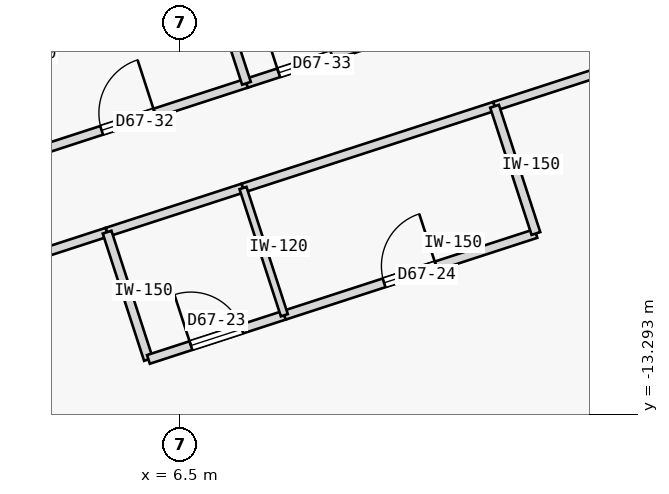
"""IFC4 building model, lengths in metres.
Left out: names, types, materials, properties, quantities, classifications, styles, units other than length and angle.
Written with IfcOpenShell. Run it as: python <this file> out.ifc"""

import sys

from ifc_helpers import new_model, si_unit, direction, frame, frame_2d, origin, place, context, subcontext, project, spatial, rectangle, extrude, element, fill, save


model = new_model("IFC4")
c1 = context("Model", 3, precision=1e-05, world=origin(), true_north=direction((0.0, 1.0)))
c2 = subcontext(c1, "Body", "Model", "MODEL_VIEW")
j1 = project(units=[si_unit("LENGTHUNIT", "METRE"), si_unit("PLANEANGLEUNIT", "RADIAN")], contexts=[c1])
p1 = place(None, origin())
s1 = spatial("IfcSite", under=j1, at=p1, CompositionType="ELEMENT")
p2 = place(p1, origin())
s2 = spatial("IfcBuilding", under=s1, at=p2, CompositionType="ELEMENT")
p3 = place(p2, frame((0.0, 0.0, 251.1)))
s3 = spatial("IfcBuildingStorey", under=s2, at=p3, CompositionType="ELEMENT", Elevation=251.1)
p4 = place(p3, frame((-1.643, -12.549, 0.0), z_axis=(0.0, 0.0, 1.0), x_axis=(0.951058161173, 0.309011931914, 0.0)))
e1 = element("IfcWall", 1, at=p4, inside=s3, PredefinedType="PARTITIONING", context=c2, shape_type="SweptSolid", body=[
    extrude(rectangle(XDim=7.297, YDim=0.15, at=frame_2d((3.648, 0.0))), origin(), (0.0, 0.0, 1.0), 2.95),
])
p5 = place(p3, frame((11.669, -8.223, 0.0), z_axis=(0.0, 0.0, 1.0), x_axis=(0.951057967787, 0.309012527106, 0.0)))
e2 = element("IfcWall", 2, at=p5, inside=s3, PredefinedType="PARTITIONING", context=c2, shape_type="SweptSolid", body=[
    extrude(rectangle(XDim=19.291, YDim=0.15, at=frame_2d((9.646, 0.0))), origin(), (0.0, 0.0, 1.0), 2.95),
])
p6 = place(p5, frame((9.17, 0.0, 0.0)))
e3 = element("IfcOpeningElement", 3, at=p6, cuts=e2, PredefinedType="OPENING", context=c2, shape_type="SweptSolid", body=[
    extrude(rectangle(XDim=0.95, YDim=2.15, at=frame_2d((0.475, 1.075))), frame((0.0, 0.085, 0.0), z_axis=(0.0, -1.0, 0.0), x_axis=(1.0, 0.0, 0.0)), (0.0, 0.0, 1.0), 0.17),
])
p7 = place(p3, frame((5.297, -10.294, 0.0), z_axis=(0.0, 0.0, 1.0), x_axis=(0.951066131077, 0.308987401554, 0.0)))
e4 = element("IfcWall", 4, at=p7, inside=s3, PredefinedType="PARTITIONING", context=c2, shape_type="SweptSolid", body=[
    extrude(rectangle(XDim=2.35, YDim=0.15, at=frame_2d((1.175, 0.0))), origin(), (0.0, 0.0, 1.0), 2.95),
])
p8 = place(p3, frame((7.531, -9.568, 0.0), z_axis=(0.0, 0.0, 1.0), x_axis=(0.951041492154, 0.309063230101, 0.0)))
e5 = element("IfcWall", 5, at=p8, inside=s3, PredefinedType="PARTITIONING", context=c2, shape_type="SweptSolid", body=[
    extrude(rectangle(XDim=4.35, YDim=0.15, at=frame_2d((2.175, 0.0))), origin(), (0.0, 0.0, 1.0), 2.95),
])
p9 = place(p3, frame((3.7, -9.109, 0.0), z_axis=(0.0, 0.0, 1.0), x_axis=(0.95106259184, 0.308998295145, 0.0)))
e6 = element("IfcWall", 6, at=p9, inside=s3, PredefinedType="PARTITIONING", context=c2, shape_type="SweptSolid", body=[
    extrude(rectangle(XDim=4.088, YDim=0.15, at=frame_2d((2.044, 0.0))), origin(), (0.0, 0.0, 1.0), 2.95),
])
p10 = place(p9, frame((1.584, 0.0, 0.0)))
e7 = element("IfcOpeningElement", 7, at=p10, cuts=e6, PredefinedType="OPENING", context=c2, shape_type="SweptSolid", body=[
    extrude(rectangle(XDim=0.92, YDim=2.15, at=frame_2d((0.46, 1.075))), frame((0.0, 0.085, 0.0), z_axis=(0.0, -1.0, 0.0), x_axis=(1.0, 0.0, 0.0)), (0.0, 0.0, 1.0), 0.17),
])
p11 = place(p3, frame((7.588, -7.846, 0.0), z_axis=(0.0, 0.0, 1.0), x_axis=(0.951058013903, 0.309012385174, 0.0)))
e8 = element("IfcWall", 8, at=p11, inside=s3, PredefinedType="PARTITIONING", context=c2, shape_type="SweptSolid", body=[
    extrude(rectangle(XDim=7.267, YDim=0.15, at=frame_2d((3.634, 0.0))), origin(), (0.0, 0.0, 1.0), 2.95),
])
p12 = place(p11, frame((0.557, 0.0, 0.0)))
e9 = element("IfcOpeningElement", 9, at=p12, cuts=e8, PredefinedType="OPENING", context=c2, shape_type="SweptSolid", body=[
    extrude(rectangle(XDim=0.92, YDim=2.15, at=frame_2d((0.46, 1.075))), frame((0.0, 0.085, 0.0), z_axis=(0.0, -1.0, 0.0), x_axis=(1.0, 0.0, 0.0)), (0.0, 0.0, 1.0), 0.17),
])
p13 = place(p3, frame((5.977, -12.386, 0.0), z_axis=(0.0, 0.0, 1.0), x_axis=(-0.309060979314, 0.951042223598, 0.0)))
e10 = element("IfcWall", 10, at=p13, inside=s3, PredefinedType="PARTITIONING", context=c2, shape_type="SweptSolid", body=[
    extrude(rectangle(XDim=2.2, YDim=0.15, at=frame_2d((1.1, 0.0))), origin(), (0.0, 0.0, 1.0), 2.95),
])
p14 = place(p3, frame((5.977, -12.386, 0.0), z_axis=(0.0, 0.0, 1.0), x_axis=(0.951066131077, 0.308987401554, 0.0)))
e11 = element("IfcWall", 11, at=p14, inside=s3, PredefinedType="PARTITIONING", context=c2, shape_type="SweptSolid", body=[
    extrude(rectangle(XDim=2.35, YDim=0.15, at=frame_2d((1.175, 0.0))), origin(), (0.0, 0.0, 1.0), 2.95),
])
p15 = place(p14, frame((0.735, 0.0, 0.0)))
e12 = element("IfcOpeningElement", 12, at=p15, cuts=e11, PredefinedType="OPENING", context=c2, shape_type="SweptSolid", body=[
    extrude(rectangle(XDim=0.88, YDim=2.15, at=frame_2d((0.44, 1.075))), frame((0.0, 0.085, 0.0), z_axis=(0.0, -1.0, 0.0), x_axis=(1.0, 0.0, 0.0)), (0.0, 0.0, 1.0), 0.17),
])
p16 = place(p3, frame((8.211, -11.66, 0.0), z_axis=(0.0, 0.0, 1.0), x_axis=(0.951057987102, 0.309012467661, 0.0)))
e13 = element("IfcWall", 13, at=p16, inside=s3, PredefinedType="PARTITIONING", context=c2, shape_type="SweptSolid", body=[
    extrude(rectangle(XDim=4.35, YDim=0.15, at=frame_2d((2.175, 0.0))), origin(), (0.0, 0.0, 1.0), 2.95),
])
p17 = place(p16, frame((1.725, 0.0, 0.0)))
e14 = element("IfcOpeningElement", 14, at=p17, cuts=e13, PredefinedType="OPENING", context=c2, shape_type="SweptSolid", body=[
    extrude(rectangle(XDim=0.9, YDim=2.15, at=frame_2d((0.45, 1.075))), frame((0.0, 0.085, 0.0), z_axis=(0.0, -1.0, 0.0), x_axis=(1.0, 0.0, 0.0)), (0.0, 0.0, 1.0), 0.17),
])
p18 = place(p3, frame((12.349, -10.316, 0.0), z_axis=(0.0, 0.0, 1.0), x_axis=(-0.309028364152, 0.951052821956, 0.0)))
e15 = element("IfcWall", 15, at=p18, inside=s3, PredefinedType="PARTITIONING", context=c2, shape_type="SweptSolid", body=[
    extrude(rectangle(XDim=2.2, YDim=0.15, at=frame_2d((1.1, 0.0))), origin(), (0.0, 0.0, 1.0), 2.95),
])
p19 = place(p3, frame((8.211, -11.66, 0.0), z_axis=(0.0, 0.0, 1.0), x_axis=(-0.309060979314, 0.951042223598, 0.0)))
e16 = element("IfcWall", 16, at=p19, inside=s3, PredefinedType="PARTITIONING", context=c2, shape_type="SweptSolid", body=[
    extrude(rectangle(XDim=2.2, YDim=0.12, at=frame_2d((1.1, 0.0))), origin(), (0.0, 0.0, 1.0), 2.95),
])
p20 = place(p3, frame((7.588, -7.846, 0.0), z_axis=(0.0, 0.0, 1.0), x_axis=(-0.309055688452, 0.951043942957, 0.0)))
e17 = element("IfcWall", 17, at=p20, inside=s3, PredefinedType="PARTITIONING", context=c2, shape_type="SweptSolid", body=[
    extrude(rectangle(XDim=2.362, YDim=0.15, at=frame_2d((1.181, 0.0))), origin(), (0.0, 0.0, 1.0), 2.95),
])
p21 = place(p15, origin())
e18 = element("IfcDoor", 18, at=p21, inside=s3, OperationType="SINGLE_SWING_LEFT", PredefinedType="DOOR", context=c2, shape_type="SweptSolid", body=[
    extrude(rectangle(XDim=0.88, YDim=2.15, at=frame_2d((0.44, 1.075))), frame((0.0, 0.025, 0.0), z_axis=(0.0, -1.0, 0.0), x_axis=(1.0, 0.0, 0.0)), (0.0, 0.0, 1.0), 0.05),
])
fill(e12, e18)
p22 = place(p17, origin())
e19 = element("IfcDoor", 19, at=p22, inside=s3, OperationType="SINGLE_SWING_RIGHT", PredefinedType="DOOR", context=c2, shape_type="SweptSolid", body=[
    extrude(rectangle(XDim=0.9, YDim=2.15, at=frame_2d((0.45, 1.075))), frame((0.0, 0.025, 0.0), z_axis=(0.0, -1.0, 0.0), x_axis=(1.0, 0.0, 0.0)), (0.0, 0.0, 1.0), 0.05),
])
fill(e14, e19)
p23 = place(p10, origin())
e20 = element("IfcDoor", 20, at=p23, inside=s3, OperationType="SINGLE_SWING_RIGHT", PredefinedType="DOOR", context=c2, shape_type="SweptSolid", body=[
    extrude(rectangle(XDim=0.92, YDim=2.15, at=frame_2d((0.46, 1.075))), frame((0.0, 0.025, 0.0), z_axis=(0.0, -1.0, 0.0), x_axis=(1.0, 0.0, 0.0)), (0.0, 0.0, 1.0), 0.05),
])
fill(e7, e20)
p24 = place(p12, origin())
e21 = element("IfcDoor", 21, at=p24, inside=s3, OperationType="SINGLE_SWING_LEFT", PredefinedType="DOOR", context=c2, shape_type="SweptSolid", body=[
    extrude(rectangle(XDim=0.92, YDim=2.15, at=frame_2d((0.46, 1.075))), frame((0.0, 0.025, 0.0), z_axis=(0.0, -1.0, 0.0), x_axis=(1.0, 0.0, 0.0)), (0.0, 0.0, 1.0), 0.05),
])
fill(e9, e21)
save(model, sys.argv[1])
